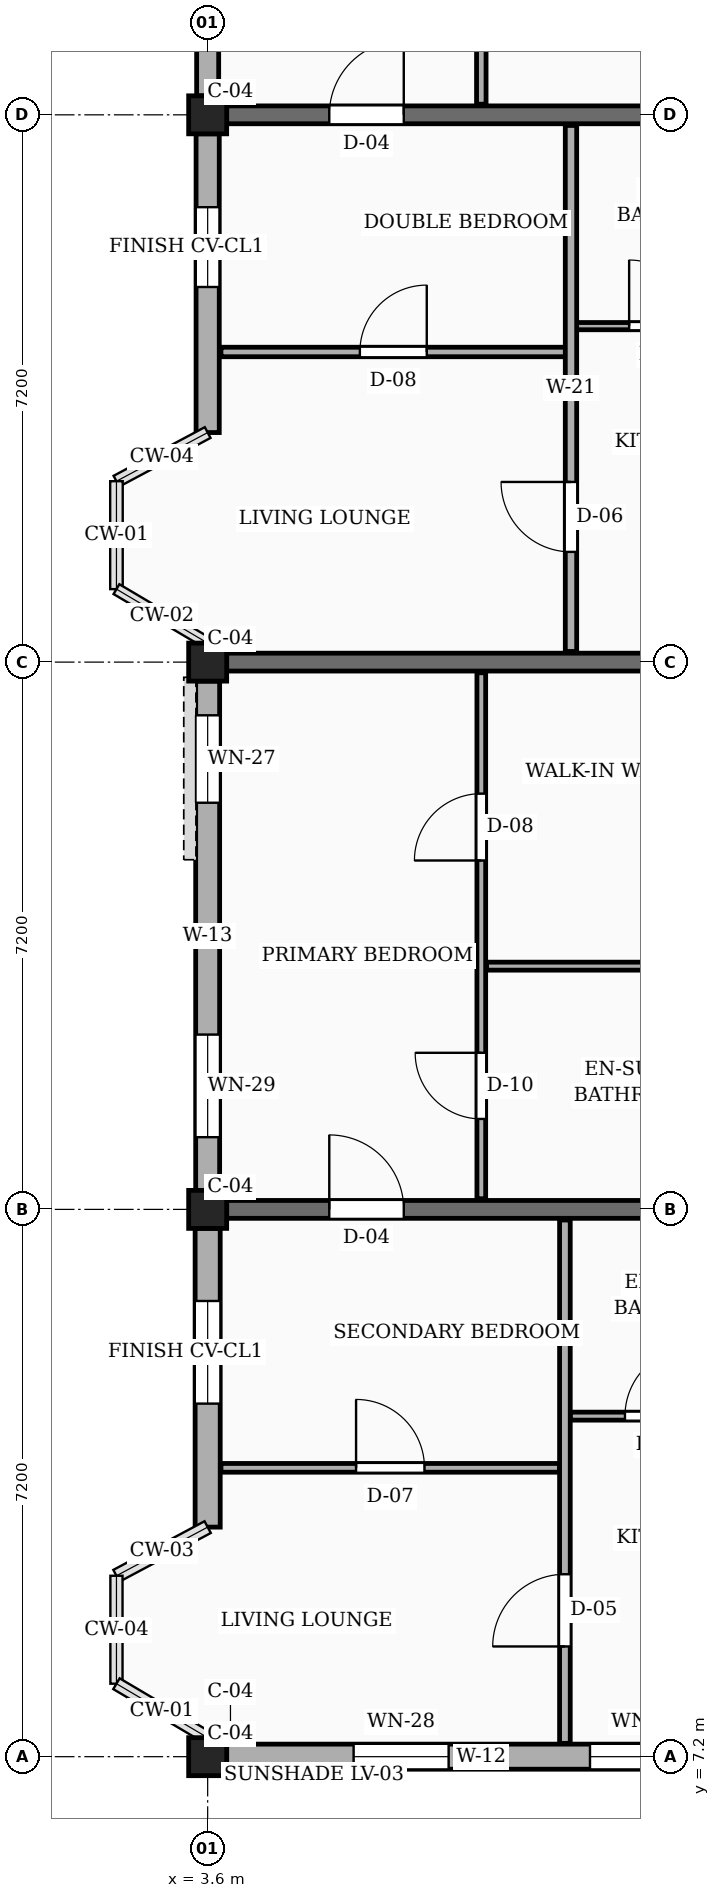
"""IFC4 building model, lengths in metres.
Left out: names, types, materials, properties, quantities, classifications, styles, units other than length and angle.
Written with IfcOpenShell. Run it as: python <this file> out.ifc"""

import sys

from ifc_helpers import new_model, si_unit, direction, frame, frame_2d, origin, origin_2d, place, context, subcontext, project, spatial, rectangle, extrude, element, fill, save


model = new_model("IFC4")
c1 = context("Model", 3, precision=1e-05, world=origin(), true_north=direction((0.0, 1.0)))
c2 = subcontext(c1, "Body", "Model", "MODEL_VIEW")
j1 = project(units=[si_unit("LENGTHUNIT", "METRE"), si_unit("PLANEANGLEUNIT", "RADIAN")], contexts=[c1])
p1 = place(None, origin())
s1 = spatial("IfcSite", under=j1, at=p1, CompositionType="ELEMENT")
p2 = place(p1, origin())
s2 = spatial("IfcBuilding", under=s1, at=p2, CompositionType="ELEMENT")
p3 = place(p2, frame((0.0, 0.0, 23.4)))
s3 = spatial("IfcBuildingStorey", under=s2, at=p3, CompositionType="ELEMENT", Elevation=23.4)
for number, where, z_axis, x_axis in (
    (1, (3.6, 7.2, 0.0), (0.0, 0.0, 1.0), (1.0, 0.0, 0.0)),
    (2, (3.6, 14.4, 0.0), (0.0, 0.0, 1.0), (1.0, 0.0, 0.0)),
    (3, (3.6, 21.6, 0.0), (0.0, 0.0, 1.0), (1.0, 0.0, 0.0)),
    (4, (3.6, 28.8, 0.0), (0.0, 0.0, 1.0), (1.0, 0.0, 0.0)),
):
    element("IfcColumn", number, at=place(p3, frame(where, z_axis=z_axis, x_axis=x_axis)), inside=s3, PredefinedType="COLUMN", context=c2, shape_type="SweptSolid", body=[
        extrude(rectangle(XDim=0.5, YDim=0.5, at=origin_2d()), origin(), (0.0, 0.0, 1.0), 3.15),
    ])
p4 = place(p3, frame((3.85, 14.4, 0.0), z_axis=(0.0, 0.0, 1.0), x_axis=(1.0, 0.0, 0.0)))
e5 = element("IfcWall", 5, at=p4, inside=s3, PredefinedType="SOLIDWALL", context=c2, shape_type="SweptSolid", body=[
    extrude(rectangle(XDim=6.75, YDim=0.235, at=frame_2d((3.375, 0.0))), origin(), (0.0, 0.0, 1.0), 2.17),
])
p5 = place(p4, frame((1.35, 0.0, 0.0)))
e6 = element("IfcOpeningElement", 6, at=p5, cuts=e5, PredefinedType="OPENING", context=c2, shape_type="SweptSolid", body=[
    extrude(rectangle(XDim=0.98, YDim=2.12, at=frame_2d((0.49, 1.06))), frame((0.0, 0.127, 0.0), z_axis=(0.0, -1.0, 0.0), x_axis=(1.0, 0.0, 0.0)), (0.0, 0.0, 1.0), 0.255),
])
p6 = place(p3, frame((3.85, 21.6, 0.0), z_axis=(0.0, 0.0, 1.0), x_axis=(1.0, 0.0, 0.0)))
e7 = element("IfcWall", 7, at=p6, inside=s3, PredefinedType="SOLIDWALL", context=c2, shape_type="SweptSolid", body=[
    extrude(rectangle(XDim=6.75, YDim=0.235, at=frame_2d((3.375, 0.0))), origin(), (0.0, 0.0, 1.0), 2.17),
])
p7 = place(p3, frame((3.85, 28.8, 0.0), z_axis=(0.0, 0.0, 1.0), x_axis=(1.0, 0.0, 0.0)))
e8 = element("IfcWall", 8, at=p7, inside=s3, PredefinedType="SOLIDWALL", context=c2, shape_type="SweptSolid", body=[
    extrude(rectangle(XDim=6.75, YDim=0.235, at=frame_2d((3.375, 0.0))), origin(), (0.0, 0.0, 1.0), 2.17),
])
p8 = place(p7, frame((1.35, 0.0, 0.0)))
e9 = element("IfcOpeningElement", 9, at=p8, cuts=e8, PredefinedType="OPENING", context=c2, shape_type="SweptSolid", body=[
    extrude(rectangle(XDim=0.98, YDim=2.12, at=frame_2d((0.49, 1.06))), frame((0.0, 0.127, 0.0), z_axis=(0.0, -1.0, 0.0), x_axis=(1.0, 0.0, 0.0)), (0.0, 0.0, 1.0), 0.255),
])
p9 = place(p3, frame((3.85, 7.2, 0.0), z_axis=(0.0, 0.0, 1.0), x_axis=(1.0, 0.0, 0.0)))
e10 = element("IfcWall", 10, at=p9, inside=s3, PredefinedType="SOLIDWALL", context=c2, shape_type="SweptSolid", body=[
    extrude(rectangle(XDim=6.7, YDim=0.33, at=frame_2d((3.35, 0.0))), origin(), (0.0, 0.0, 1.0), 2.44),
])
p10 = place(p9, frame((1.67, 0.0, 0.78)))
e11 = element("IfcOpeningElement", 11, at=p10, cuts=e10, PredefinedType="OPENING", context=c2, shape_type="SweptSolid", body=[
    extrude(rectangle(XDim=1.25, YDim=1.44, at=frame_2d((0.625, 0.72))), frame((0.0, 0.175, 0.0), z_axis=(0.0, -1.0, 0.0), x_axis=(1.0, 0.0, 0.0)), (0.0, 0.0, 1.0), 0.35),
])
p11 = place(p9, frame((4.78, 0.0, 0.78)))
e12 = element("IfcOpeningElement", 12, at=p11, cuts=e10, PredefinedType="OPENING", context=c2, shape_type="SweptSolid", body=[
    extrude(rectangle(XDim=1.45, YDim=1.44, at=frame_2d((0.725, 0.72))), frame((0.0, 0.175, 0.0), z_axis=(0.0, -1.0, 0.0), x_axis=(1.0, 0.0, 0.0)), (0.0, 0.0, 1.0), 0.35),
])
p12 = place(p3, frame((3.6, 35.75, 0.0), z_axis=(0.0, 0.0, 1.0), x_axis=(0.0, -1.0, 0.0)))
e13 = element("IfcWall", 13, at=p12, inside=s3, PredefinedType="SOLIDWALL", context=c2, shape_type="SweptSolid", body=[
    extrude(rectangle(XDim=6.7, YDim=0.29, at=frame_2d((3.35, 0.0))), origin(), (0.0, 0.0, 1.0), 2.44),
])
p13 = place(p12, frame((0.45, 0.0, 0.78)))
e14 = element("IfcOpeningElement", 14, at=p13, cuts=e13, PredefinedType="OPENING", context=c2, shape_type="SweptSolid", body=[
    extrude(rectangle(XDim=1.46, YDim=1.36, at=frame_2d((0.73, 0.68))), frame((0.0, 0.155, 0.0), z_axis=(0.0, -1.0, 0.0), x_axis=(1.0, 0.0, 0.0)), (0.0, 0.0, 1.0), 0.31),
])
p14 = place(p12, frame((4.65, 0.0, 0.78)))
e15 = element("IfcOpeningElement", 15, at=p14, cuts=e13, PredefinedType="OPENING", context=c2, shape_type="SweptSolid", body=[
    extrude(rectangle(XDim=1.05, YDim=1.44, at=frame_2d((0.525, 0.72))), frame((0.0, 0.155, 0.0), z_axis=(0.0, -1.0, 0.0), x_axis=(1.0, 0.0, 0.0)), (0.0, 0.0, 1.0), 0.31),
])
p15 = place(p3, frame((3.6, 28.55, 0.0), z_axis=(0.0, 0.0, 1.0), x_axis=(0.0, -1.0, 0.0)))
e16 = element("IfcWall", 16, at=p15, inside=s3, PredefinedType="SOLIDWALL", context=c2, shape_type="SweptSolid", body=[
    extrude(rectangle(XDim=3.93, YDim=0.305, at=frame_2d((1.965, 0.0))), origin(), (0.0, 0.0, 1.0), 2.44),
])
p16 = place(p15, frame((0.965, 0.0, 0.78)))
e17 = element("IfcOpeningElement", 17, at=p16, cuts=e16, PredefinedType="OPENING", context=c2, shape_type="SweptSolid", body=[
    extrude(rectangle(XDim=1.05, YDim=1.44, at=frame_2d((0.525, 0.72))), frame((0.0, 0.163, 0.0), z_axis=(0.0, -1.0, 0.0), x_axis=(1.0, 0.0, 0.0)), (0.0, 0.0, 1.0), 0.325),
])
p17 = place(p3, frame((3.6, 21.35, 0.0), z_axis=(0.0, 0.0, 1.0), x_axis=(0.0, -1.0, 0.0)))
e18 = element("IfcWall", 18, at=p17, inside=s3, PredefinedType="SOLIDWALL", context=c2, shape_type="SweptSolid", body=[
    extrude(rectangle(XDim=6.7, YDim=0.315, at=frame_2d((3.35, 0.0))), origin(), (0.0, 0.0, 1.0), 2.44),
])
p18 = place(p17, frame((0.45, 0.0, 0.78)))
e19 = element("IfcOpeningElement", 19, at=p18, cuts=e18, PredefinedType="OPENING", context=c2, shape_type="SweptSolid", body=[
    extrude(rectangle(XDim=1.15, YDim=1.44, at=frame_2d((0.575, 0.72))), frame((0.0, 0.167, 0.0), z_axis=(0.0, -1.0, 0.0), x_axis=(1.0, 0.0, 0.0)), (0.0, 0.0, 1.0), 0.335),
])
p19 = place(p17, frame((4.65, 0.0, 0.78)))
e20 = element("IfcOpeningElement", 20, at=p19, cuts=e18, PredefinedType="OPENING", context=c2, shape_type="SweptSolid", body=[
    extrude(rectangle(XDim=1.35, YDim=1.44, at=frame_2d((0.675, 0.72))), frame((0.0, 0.167, 0.0), z_axis=(0.0, -1.0, 0.0), x_axis=(1.0, 0.0, 0.0)), (0.0, 0.0, 1.0), 0.335),
])
p20 = place(p3, frame((3.6, 14.15, 0.0), z_axis=(0.0, 0.0, 1.0), x_axis=(0.0, -1.0, 0.0)))
e21 = element("IfcWall", 21, at=p20, inside=s3, PredefinedType="SOLIDWALL", context=c2, shape_type="SweptSolid", body=[
    extrude(rectangle(XDim=3.93, YDim=0.33, at=frame_2d((1.965, 0.0))), origin(), (0.0, 0.0, 1.0), 2.44),
])
p21 = place(p20, frame((0.955, 0.0, 0.78)))
e22 = element("IfcOpeningElement", 22, at=p21, cuts=e21, PredefinedType="OPENING", context=c2, shape_type="SweptSolid", body=[
    extrude(rectangle(XDim=1.35, YDim=1.44, at=frame_2d((0.675, 0.72))), frame((0.0, 0.175, 0.0), z_axis=(0.0, -1.0, 0.0), x_axis=(1.0, 0.0, 0.0)), (0.0, 0.0, 1.0), 0.35),
])
p22 = place(p3, frame((3.775, 11.0, 0.0), z_axis=(0.0, 0.0, 1.0), x_axis=(1.0, 0.0, 0.0)))
e23 = element("IfcWall", 23, at=p22, inside=s3, PredefinedType="PARTITIONING", context=c2, shape_type="SweptSolid", body=[
    extrude(rectangle(XDim=4.455, YDim=0.115, at=frame_2d((2.228, 0.0))), origin(), (0.0, 0.0, 1.0), 2.305),
])
p23 = place(p22, frame((1.778, 0.0, 0.0)))
e24 = element("IfcOpeningElement", 24, at=p23, cuts=e23, PredefinedType="OPENING", context=c2, shape_type="SweptSolid", body=[
    extrude(rectangle(XDim=0.9, YDim=2.1, at=frame_2d((0.45, 1.05))), frame((0.0, 0.067, 0.0), z_axis=(0.0, -1.0, 0.0), x_axis=(1.0, 0.0, 0.0)), (0.0, 0.0, 1.0), 0.135),
])
p24 = place(p3, frame((8.37, 11.68, 0.0), z_axis=(0.0, 0.0, 1.0), x_axis=(1.0, 0.0, 0.0)))
e25 = element("IfcWall", 25, at=p24, inside=s3, PredefinedType="PARTITIONING", context=c2, shape_type="SweptSolid", body=[
    extrude(rectangle(XDim=2.34, YDim=0.105, at=frame_2d((1.17, 0.0))), origin(), (0.0, 0.0, 1.0), 2.305),
])
p25 = place(p24, frame((0.72, 0.0, 0.0)))
e26 = element("IfcOpeningElement", 26, at=p25, cuts=e25, PredefinedType="OPENING", context=c2, shape_type="SweptSolid", body=[
    extrude(rectangle(XDim=0.9, YDim=2.05, at=frame_2d((0.45, 1.025))), frame((0.0, 0.062, 0.0), z_axis=(0.0, -1.0, 0.0), x_axis=(1.0, 0.0, 0.0)), (0.0, 0.0, 1.0), 0.125),
])
p26 = place(p3, frame((8.3, 7.375, 0.0), z_axis=(0.0, 0.0, 1.0), x_axis=(0.0, 1.0, 0.0)))
e27 = element("IfcWall", 27, at=p26, inside=s3, PredefinedType="PARTITIONING", context=c2, shape_type="SweptSolid", body=[
    extrude(rectangle(XDim=6.885, YDim=0.14, at=frame_2d((3.442, 0.0))), origin(), (0.0, 0.0, 1.0), 2.305),
])
p27 = place(p26, frame((1.275, 0.0, 0.0)))
e28 = element("IfcOpeningElement", 28, at=p27, cuts=e27, PredefinedType="OPENING", context=c2, shape_type="SweptSolid", body=[
    extrude(rectangle(XDim=0.95, YDim=2.1, at=frame_2d((0.475, 1.05))), frame((0.0, 0.08, 0.0), z_axis=(0.0, -1.0, 0.0), x_axis=(1.0, 0.0, 0.0)), (0.0, 0.0, 1.0), 0.16),
])
p28 = place(p3, frame((7.2, 14.54, 0.0), z_axis=(0.0, 0.0, 1.0), x_axis=(0.0, 1.0, 0.0)))
e29 = element("IfcWall", 29, at=p28, inside=s3, PredefinedType="PARTITIONING", context=c2, shape_type="SweptSolid", body=[
    extrude(rectangle(XDim=6.92, YDim=0.115, at=frame_2d((3.46, 0.0))), origin(), (0.0, 0.0, 1.0), 2.305),
])
p29 = place(p28, frame((1.05, 0.0, 0.0)))
e30 = element("IfcOpeningElement", 30, at=p29, cuts=e29, PredefinedType="OPENING", context=c2, shape_type="SweptSolid", body=[
    extrude(rectangle(XDim=0.87, YDim=2.05, at=frame_2d((0.435, 1.025))), frame((0.0, 0.067, 0.0), z_axis=(0.0, -1.0, 0.0), x_axis=(1.0, 0.0, 0.0)), (0.0, 0.0, 1.0), 0.135),
])
p30 = place(p28, frame((4.45, 0.0, 0.0)))
e31 = element("IfcOpeningElement", 31, at=p30, cuts=e29, PredefinedType="OPENING", context=c2, shape_type="SweptSolid", body=[
    extrude(rectangle(XDim=0.88, YDim=2.08, at=frame_2d((0.44, 1.04))), frame((0.0, 0.067, 0.0), z_axis=(0.0, -1.0, 0.0), x_axis=(1.0, 0.0, 0.0)), (0.0, 0.0, 1.0), 0.135),
])
p31 = place(p3, frame((7.27, 17.6, 0.0), z_axis=(0.0, 0.0, 1.0), x_axis=(1.0, 0.0, 0.0)))
e32 = element("IfcWall", 32, at=p31, inside=s3, PredefinedType="PARTITIONING", context=c2, shape_type="SweptSolid", body=[
    extrude(rectangle(XDim=3.39, YDim=0.105, at=frame_2d((1.695, 0.0))), origin(), (0.0, 0.0, 1.0), 2.305),
])
p32 = place(p3, frame((3.775, 25.68, 0.0), z_axis=(0.0, 0.0, 1.0), x_axis=(1.0, 0.0, 0.0)))
e33 = element("IfcWall", 33, at=p32, inside=s3, PredefinedType="PARTITIONING", context=c2, shape_type="SweptSolid", body=[
    extrude(rectangle(XDim=4.535, YDim=0.125, at=frame_2d((2.268, 0.0))), origin(), (0.0, 0.0, 1.0), 2.305),
])
p33 = place(p32, frame((1.827, 0.0, 0.0)))
e34 = element("IfcOpeningElement", 34, at=p33, cuts=e33, PredefinedType="OPENING", context=c2, shape_type="SweptSolid", body=[
    extrude(rectangle(XDim=0.88, YDim=2.08, at=frame_2d((0.44, 1.04))), frame((0.0, 0.073, 0.0), z_axis=(0.0, -1.0, 0.0), x_axis=(1.0, 0.0, 0.0)), (0.0, 0.0, 1.0), 0.145),
])
p34 = place(p3, frame((8.45, 26.02, 0.0), z_axis=(0.0, 0.0, 1.0), x_axis=(1.0, 0.0, 0.0)))
e35 = element("IfcWall", 35, at=p34, inside=s3, PredefinedType="PARTITIONING", context=c2, shape_type="SweptSolid", body=[
    extrude(rectangle(XDim=2.26, YDim=0.095, at=frame_2d((1.13, 0.0))), origin(), (0.0, 0.0, 1.0), 2.305),
])
p35 = place(p34, frame((0.695, 0.0, 0.0)))
e36 = element("IfcOpeningElement", 36, at=p35, cuts=e35, PredefinedType="OPENING", context=c2, shape_type="SweptSolid", body=[
    extrude(rectangle(XDim=0.87, YDim=2.05, at=frame_2d((0.435, 1.025))), frame((0.0, 0.058, 0.0), z_axis=(0.0, -1.0, 0.0), x_axis=(1.0, 0.0, 0.0)), (0.0, 0.0, 1.0), 0.115),
])
p36 = place(p3, frame((8.38, 21.74, 0.0), z_axis=(0.0, 0.0, 1.0), x_axis=(0.0, 1.0, 0.0)))
e37 = element("IfcWall", 37, at=p36, inside=s3, PredefinedType="PARTITIONING", context=c2, shape_type="SweptSolid", body=[
    extrude(rectangle(XDim=6.92, YDim=0.15, at=frame_2d((3.46, 0.0))), origin(), (0.0, 0.0, 1.0), 2.305),
])
p37 = place(p36, frame((1.31, 0.0, 0.0)))
e38 = element("IfcOpeningElement", 38, at=p37, cuts=e37, PredefinedType="OPENING", context=c2, shape_type="SweptSolid", body=[
    extrude(rectangle(XDim=0.92, YDim=2.1, at=frame_2d((0.46, 1.05))), frame((0.0, 0.085, 0.0), z_axis=(0.0, -1.0, 0.0), x_axis=(1.0, 0.0, 0.0)), (0.0, 0.0, 1.0), 0.17),
])
p38 = place(p3, frame((7.2, 28.94, 0.0), z_axis=(0.0, 0.0, 1.0), x_axis=(0.0, 1.0, 0.0)))
e39 = element("IfcWall", 39, at=p38, inside=s3, PredefinedType="PARTITIONING", context=c2, shape_type="SweptSolid", body=[
    extrude(rectangle(XDim=6.92, YDim=0.125, at=frame_2d((3.46, 0.0))), origin(), (0.0, 0.0, 1.0), 2.305),
])
p39 = place(p38, frame((1.05, 0.0, 0.0)))
e40 = element("IfcOpeningElement", 40, at=p39, cuts=e39, PredefinedType="OPENING", context=c2, shape_type="SweptSolid", body=[
    extrude(rectangle(XDim=0.87, YDim=2.05, at=frame_2d((0.435, 1.025))), frame((0.0, 0.073, 0.0), z_axis=(0.0, -1.0, 0.0), x_axis=(1.0, 0.0, 0.0)), (0.0, 0.0, 1.0), 0.145),
])
p40 = place(p38, frame((4.45, 0.0, 0.0)))
e41 = element("IfcOpeningElement", 41, at=p40, cuts=e39, PredefinedType="OPENING", context=c2, shape_type="SweptSolid", body=[
    extrude(rectangle(XDim=0.88, YDim=2.08, at=frame_2d((0.44, 1.04))), frame((0.0, 0.073, 0.0), z_axis=(0.0, -1.0, 0.0), x_axis=(1.0, 0.0, 0.0)), (0.0, 0.0, 1.0), 0.145),
])
p41 = place(p10, origin())
e42 = element("IfcWindow", 42, at=p41, inside=s3, PartitioningType="SINGLE_PANEL", PredefinedType="WINDOW", context=c2, shape_type="SweptSolid", body=[
    extrude(rectangle(XDim=1.25, YDim=1.44, at=frame_2d((0.625, 0.72))), frame((0.0, 0.03, 0.0), z_axis=(0.0, -1.0, 0.0), x_axis=(1.0, 0.0, 0.0)), (0.0, 0.0, 1.0), 0.06),
])
fill(e11, e42)
p42 = place(p11, origin())
e43 = element("IfcWindow", 43, at=p42, inside=s3, PartitioningType="SINGLE_PANEL", PredefinedType="WINDOW", context=c2, shape_type="SweptSolid", body=[
    extrude(rectangle(XDim=1.45, YDim=1.44, at=frame_2d((0.725, 0.72))), frame((0.0, 0.03, 0.0), z_axis=(0.0, -1.0, 0.0), x_axis=(1.0, 0.0, 0.0)), (0.0, 0.0, 1.0), 0.06),
])
fill(e12, e43)
p43 = place(p16, origin())
e44 = element("IfcWindow", 44, at=p43, inside=s3, PartitioningType="SINGLE_PANEL", PredefinedType="WINDOW", context=c2, shape_type="SweptSolid", body=[
    extrude(rectangle(XDim=1.05, YDim=1.44, at=frame_2d((0.525, 0.72))), frame((0.0, 0.03, 0.0), z_axis=(0.0, -1.0, 0.0), x_axis=(1.0, 0.0, 0.0)), (0.0, 0.0, 1.0), 0.06),
])
fill(e17, e44)
p44 = place(p18, origin())
e45 = element("IfcWindow", 45, at=p44, inside=s3, PartitioningType="SINGLE_PANEL", PredefinedType="WINDOW", context=c2, shape_type="SweptSolid", body=[
    extrude(rectangle(XDim=1.15, YDim=1.44, at=frame_2d((0.575, 0.72))), frame((0.0, 0.03, 0.0), z_axis=(0.0, -1.0, 0.0), x_axis=(1.0, 0.0, 0.0)), (0.0, 0.0, 1.0), 0.06),
])
fill(e19, e45)
p45 = place(p19, origin())
e46 = element("IfcWindow", 46, at=p45, inside=s3, PartitioningType="SINGLE_PANEL", PredefinedType="WINDOW", context=c2, shape_type="SweptSolid", body=[
    extrude(rectangle(XDim=1.35, YDim=1.44, at=frame_2d((0.675, 0.72))), frame((0.0, 0.03, 0.0), z_axis=(0.0, -1.0, 0.0), x_axis=(1.0, 0.0, 0.0)), (0.0, 0.0, 1.0), 0.06),
])
fill(e20, e46)
p46 = place(p21, origin())
e47 = element("IfcWindow", 47, at=p46, inside=s3, PartitioningType="SINGLE_PANEL", PredefinedType="WINDOW", context=c2, shape_type="SweptSolid", body=[
    extrude(rectangle(XDim=1.35, YDim=1.44, at=frame_2d((0.675, 0.72))), frame((0.0, 0.03, 0.0), z_axis=(0.0, -1.0, 0.0), x_axis=(1.0, 0.0, 0.0)), (0.0, 0.0, 1.0), 0.06),
])
fill(e22, e47)
p47 = place(p23, origin())
e48 = element("IfcDoor", 48, at=p47, inside=s3, OperationType="SINGLE_SWING_LEFT", PredefinedType="DOOR", context=c2, shape_type="SweptSolid", body=[
    extrude(rectangle(XDim=0.9, YDim=2.1, at=frame_2d((0.45, 1.05))), frame((0.0, 0.025, 0.0), z_axis=(0.0, -1.0, 0.0), x_axis=(1.0, 0.0, 0.0)), (0.0, 0.0, 1.0), 0.05),
])
fill(e24, e48)
p48 = place(p25, origin())
e49 = element("IfcDoor", 49, at=p48, inside=s3, OperationType="SINGLE_SWING_RIGHT", PredefinedType="DOOR", context=c2, shape_type="SweptSolid", body=[
    extrude(rectangle(XDim=0.9, YDim=2.05, at=frame_2d((0.45, 1.025))), frame((0.0, 0.025, 0.0), z_axis=(0.0, -1.0, 0.0), x_axis=(1.0, 0.0, 0.0)), (0.0, 0.0, 1.0), 0.05),
])
fill(e26, e49)
p49 = place(p27, origin())
e50 = element("IfcDoor", 50, at=p49, inside=s3, OperationType="SINGLE_SWING_LEFT", PredefinedType="DOOR", context=c2, shape_type="SweptSolid", body=[
    extrude(rectangle(XDim=0.95, YDim=2.1, at=frame_2d((0.475, 1.05))), frame((0.0, 0.025, 0.0), z_axis=(0.0, -1.0, 0.0), x_axis=(1.0, 0.0, 0.0)), (0.0, 0.0, 1.0), 0.05),
])
fill(e28, e50)
p50 = place(p29, origin())
e51 = element("IfcDoor", 51, at=p50, inside=s3, OperationType="SINGLE_SWING_RIGHT", PredefinedType="DOOR", context=c2, shape_type="SweptSolid", body=[
    extrude(rectangle(XDim=0.87, YDim=2.05, at=frame_2d((0.435, 1.025))), frame((0.0, 0.025, 0.0), z_axis=(0.0, -1.0, 0.0), x_axis=(1.0, 0.0, 0.0)), (0.0, 0.0, 1.0), 0.05),
])
fill(e30, e51)
p51 = place(p30, origin())
e52 = element("IfcDoor", 52, at=p51, inside=s3, OperationType="SINGLE_SWING_LEFT", PredefinedType="DOOR", context=c2, shape_type="SweptSolid", body=[
    extrude(rectangle(XDim=0.88, YDim=2.08, at=frame_2d((0.44, 1.04))), frame((0.0, 0.025, 0.0), z_axis=(0.0, -1.0, 0.0), x_axis=(1.0, 0.0, 0.0)), (0.0, 0.0, 1.0), 0.05),
])
fill(e31, e52)
p52 = place(p33, origin())
e53 = element("IfcDoor", 53, at=p52, inside=s3, OperationType="SINGLE_SWING_RIGHT", PredefinedType="DOOR", context=c2, shape_type="SweptSolid", body=[
    extrude(rectangle(XDim=0.88, YDim=2.08, at=frame_2d((0.44, 1.04))), frame((0.0, 0.025, 0.0), z_axis=(0.0, -1.0, 0.0), x_axis=(1.0, 0.0, 0.0)), (0.0, 0.0, 1.0), 0.05),
])
fill(e34, e53)
p53 = place(p35, origin())
e54 = element("IfcDoor", 54, at=p53, inside=s3, OperationType="SINGLE_SWING_LEFT", PredefinedType="DOOR", context=c2, shape_type="SweptSolid", body=[
    extrude(rectangle(XDim=0.87, YDim=2.05, at=frame_2d((0.435, 1.025))), frame((0.0, 0.025, 0.0), z_axis=(0.0, -1.0, 0.0), x_axis=(1.0, 0.0, 0.0)), (0.0, 0.0, 1.0), 0.05),
])
fill(e36, e54)
p54 = place(p37, origin())
e55 = element("IfcDoor", 55, at=p54, inside=s3, OperationType="SINGLE_SWING_RIGHT", PredefinedType="DOOR", context=c2, shape_type="SweptSolid", body=[
    extrude(rectangle(XDim=0.92, YDim=2.1, at=frame_2d((0.46, 1.05))), frame((0.0, 0.025, 0.0), z_axis=(0.0, -1.0, 0.0), x_axis=(1.0, 0.0, 0.0)), (0.0, 0.0, 1.0), 0.05),
])
fill(e38, e55)
p55 = place(p5, origin())
e56 = element("IfcDoor", 56, at=p55, inside=s3, OperationType="SINGLE_SWING_LEFT", PredefinedType="DOOR", context=c2, shape_type="SweptSolid", body=[
    extrude(rectangle(XDim=0.98, YDim=2.12, at=frame_2d((0.49, 1.06))), frame((0.0, 0.025, 0.0), z_axis=(0.0, -1.0, 0.0), x_axis=(1.0, 0.0, 0.0)), (0.0, 0.0, 1.0), 0.05),
])
fill(e6, e56)
p56 = place(p8, origin())
e57 = element("IfcDoor", 57, at=p56, inside=s3, OperationType="SINGLE_SWING_RIGHT", PredefinedType="DOOR", context=c2, shape_type="SweptSolid", body=[
    extrude(rectangle(XDim=0.98, YDim=2.12, at=frame_2d((0.49, 1.06))), frame((0.0, 0.025, 0.0), z_axis=(0.0, -1.0, 0.0), x_axis=(1.0, 0.0, 0.0)), (0.0, 0.0, 1.0), 0.05),
])
fill(e9, e57)
save(model, sys.argv[1])
